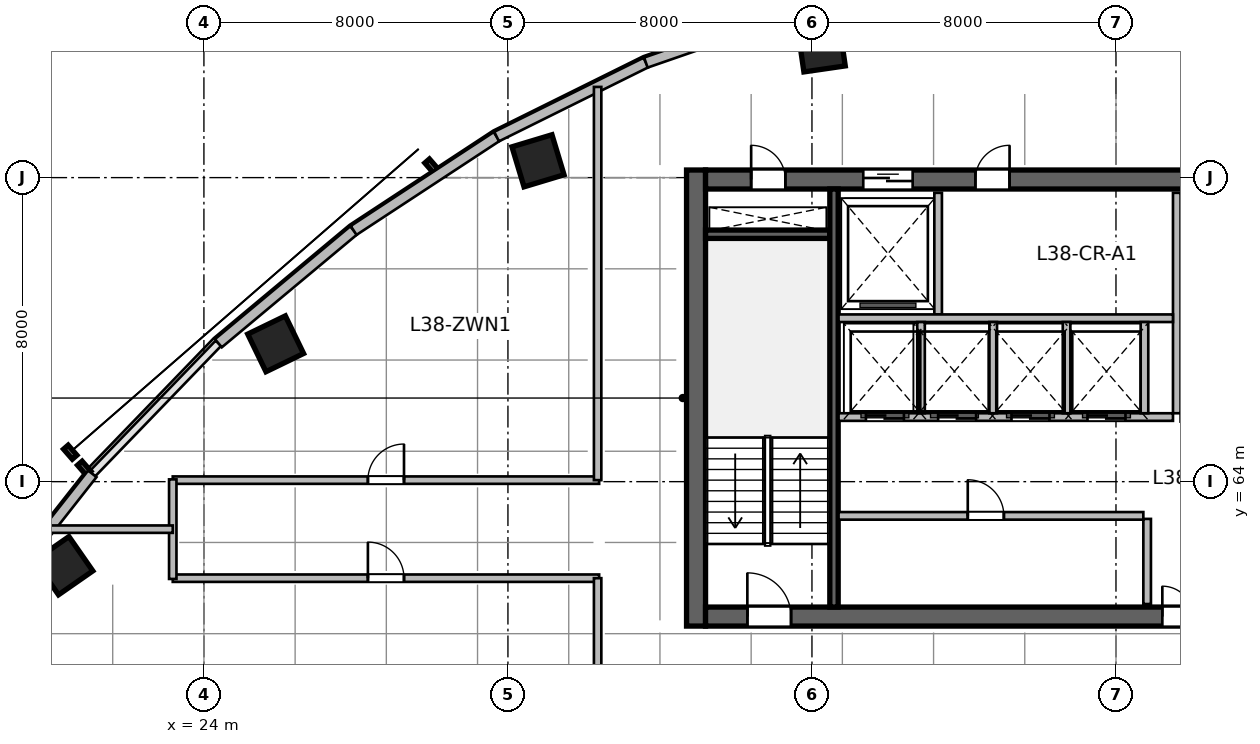
"""IFC4 building model, lengths in metres.
Left out: names, types, materials, properties, quantities, classifications, styles, units other than length and angle.
Written with IfcOpenShell. Run it as: python <this file> out.ifc"""

import sys

from ifc_helpers import new_model, si_unit, direction, frame, frame_2d, origin, origin_2d, place, context, subcontext, project, spatial, rectangle, extrude, source, transform, mapped, element, fill, save


model = new_model("IFC4")
c1 = context("Model", 3, precision=1e-05, world=origin(), true_north=direction((0.0, 1.0)))
c2 = subcontext(c1, "Body", "Model", "MODEL_VIEW")
j1 = project(units=[si_unit("LENGTHUNIT", "METRE"), si_unit("PLANEANGLEUNIT", "RADIAN")], contexts=[c1])
p1 = place(None, origin())
s1 = spatial("IfcSite", under=j1, at=p1, CompositionType="ELEMENT")
p2 = place(p1, origin())
s2 = spatial("IfcBuilding", under=s1, at=p2, CompositionType="ELEMENT")
p3 = place(p2, frame((0.0, 0.0, 158.4)))
s3 = spatial("IfcBuildingStorey", under=s2, at=p3, CompositionType="ELEMENT", Elevation=158.4)
m1 = source(origin(), c2, "Body", "SweptSolid", [
    extrude(rectangle(XDim=12.0, YDim=0.5, at=frame_2d((6.0, 0.0))), origin(), (0.0, 0.0, 1.0), 3.9),
])
p4 = place(p3, frame((36.95, 60.2, 0.0), z_axis=(0.0, 0.0, 1.0), x_axis=(0.0, 1.0, 0.0)))
e1 = element("IfcWall", 1, at=p4, inside=s3, PredefinedType="SHEAR", context=c2, shape_type="MappedRepresentation", body=[
    mapped(m1, transform((0.0, 0.0, 0.0), scale=1.0)),
])
m2 = source(origin(), c2, "Body", "SweptSolid", [
    extrude(rectangle(XDim=21.6, YDim=0.5, at=frame_2d((10.8, 0.0))), origin(), (0.0, 0.0, 1.0), 3.9),
])
p5 = place(p3, frame((37.2, 60.45, 0.0), z_axis=(0.0, 0.0, 1.0), x_axis=(1.0, 0.0, 0.0)))
e2 = element("IfcWall", 2, at=p5, inside=s3, PredefinedType="SHEAR", context=c2, shape_type="MappedRepresentation", body=[
    mapped(m2, transform((0.0, 0.0, 0.0), scale=1.0)),
])
p6 = place(p5, frame((1.1, 0.0, 0.0)))
e3 = element("IfcOpeningElement", 3, at=p6, cuts=e2, PredefinedType="OPENING", context=c2, shape_type="SweptSolid", body=[
    extrude(rectangle(XDim=1.15, YDim=2.15, at=frame_2d((0.575, 1.075))), frame((0.0, 0.26, 0.0), z_axis=(0.0, -1.0, 0.0), x_axis=(1.0, 0.0, 0.0)), (0.0, 0.0, 1.0), 0.52),
])
p7 = place(p5, frame((19.5, 0.0, 0.0)))
e4 = element("IfcOpeningElement", 4, at=p7, cuts=e2, PredefinedType="OPENING", context=c2, shape_type="SweptSolid", body=[
    extrude(rectangle(XDim=0.9, YDim=2.1, at=frame_2d((0.45, 1.05))), frame((0.0, 0.26, 0.0), z_axis=(0.0, -1.0, 0.0), x_axis=(1.0, 0.0, 0.0)), (0.0, 0.0, 1.0), 0.52),
])
p8 = place(p5, frame((12.02, 0.0, 0.0)))
e5 = element("IfcOpeningElement", 5, at=p8, cuts=e2, PredefinedType="OPENING", context=c2, shape_type="SweptSolid", body=[
    extrude(rectangle(XDim=1.6, YDim=2.15, at=frame_2d((0.8, 1.075))), frame((0.0, 0.26, 0.0), z_axis=(0.0, -1.0, 0.0), x_axis=(1.0, 0.0, 0.0)), (0.0, 0.0, 1.0), 0.52),
])
p9 = place(p3, frame((37.2, 71.95, 0.0), z_axis=(0.0, 0.0, 1.0), x_axis=(1.0, 0.0, 0.0)))
e6 = element("IfcWall", 6, at=p9, inside=s3, PredefinedType="SHEAR", context=c2, shape_type="MappedRepresentation", body=[
    mapped(m2, transform((0.0, 0.0, 0.0), scale=1.0)),
])
p10 = place(p9, frame((1.2, 0.0, 0.0)))
e7 = element("IfcOpeningElement", 7, at=p10, cuts=e6, PredefinedType="OPENING", context=c2, shape_type="SweptSolid", body=[
    extrude(rectangle(XDim=0.9, YDim=2.1, at=frame_2d((0.45, 1.05))), frame((0.0, 0.26, 0.0), z_axis=(0.0, -1.0, 0.0), x_axis=(1.0, 0.0, 0.0)), (0.0, 0.0, 1.0), 0.52),
])
p11 = place(p9, frame((14.7, 0.0, 0.0)))
e8 = element("IfcOpeningElement", 8, at=p11, cuts=e6, PredefinedType="OPENING", context=c2, shape_type="SweptSolid", body=[
    extrude(rectangle(XDim=1.2, YDim=2.15, at=frame_2d((0.6, 1.075))), frame((0.0, 0.26, 0.0), z_axis=(0.0, -1.0, 0.0), x_axis=(1.0, 0.0, 0.0)), (0.0, 0.0, 1.0), 0.52),
])
p12 = place(p9, frame((4.15, 0.0, 0.0)))
e9 = element("IfcOpeningElement", 9, at=p12, cuts=e6, PredefinedType="OPENING", context=c2, shape_type="SweptSolid", body=[
    extrude(rectangle(XDim=1.3, YDim=2.15, at=frame_2d((0.65, 1.075))), frame((0.0, 0.26, 0.0), z_axis=(0.0, -1.0, 0.0), x_axis=(1.0, 0.0, 0.0)), (0.0, 0.0, 1.0), 0.52),
])
p13 = place(p9, frame((7.1, 0.0, 0.0)))
e10 = element("IfcOpeningElement", 10, at=p13, cuts=e6, PredefinedType="OPENING", context=c2, shape_type="SweptSolid", body=[
    extrude(rectangle(XDim=0.9, YDim=2.1, at=frame_2d((0.45, 1.05))), frame((0.0, 0.26, 0.0), z_axis=(0.0, -1.0, 0.0), x_axis=(1.0, 0.0, 0.0)), (0.0, 0.0, 1.0), 0.52),
])
m3 = source(origin(), c2, "Body", "SweptSolid", [
    extrude(rectangle(XDim=3.27, YDim=0.22, at=frame_2d((1.635, 0.0))), origin(), (0.0, 0.0, 1.0), 3.9),
])
p14 = place(p3, frame((37.2, 70.51, 0.0), z_axis=(0.0, 0.0, 1.0), x_axis=(1.0, 0.0, 0.0)))
e11 = element("IfcWall", 11, at=p14, inside=s3, PredefinedType="SHEAR", context=c2, shape_type="MappedRepresentation", body=[
    mapped(m3, transform((0.0, 0.0, 0.0), scale=1.0)),
])
m4 = source(origin(), c2, "Body", "SweptSolid", [
    extrude(rectangle(XDim=11.0, YDim=0.22, at=frame_2d((5.5, 0.0))), origin(), (0.0, 0.0, 1.0), 3.9),
])
p15 = place(p3, frame((40.58, 60.7, 0.0), z_axis=(0.0, 0.0, 1.0), x_axis=(0.0, 1.0, 0.0)))
e12 = element("IfcWall", 12, at=p15, inside=s3, PredefinedType="SHEAR", context=c2, shape_type="MappedRepresentation", body=[
    mapped(m4, transform((0.0, 0.0, 0.0), scale=1.0)),
])
m5 = source(origin(), c2, "Body", "SweptSolid", [
    extrude(rectangle(XDim=1.1, YDim=1.1, at=origin_2d()), origin(), (0.0, 0.0, 1.0), 3.9),
])
for number, where, z_axis, x_axis in (
    (13, (20.311, 61.789, 0.0), (0.0, 0.0, 1.0), (-0.571, 0.821, 0.0)),
    (14, (25.888, 67.627, 0.0), (0.0, 0.0, 1.0), (-0.436, 0.9, 0.0)),
    (15, (32.791, 72.442, 0.0), (0.0, 0.0, 1.0), (-0.289, 0.957, 0.0)),
    (16, (40.253, 75.404, 0.0), (0.0, 0.0, 1.0), (-0.143, 0.99, 0.0)),
):
    element("IfcColumn", number, at=place(p3, frame(where, z_axis=z_axis, x_axis=x_axis)), inside=s3, PredefinedType="COLUMN", context=c2, shape_type="MappedRepresentation", body=[
        mapped(m5, transform((0.0, 0.0, 0.0), scale=1.0)),
    ])
m6 = source(origin(), c2, "Body", "SweptSolid", [
    extrude(rectangle(XDim=4.922, YDim=0.28, at=frame_2d((2.461, 0.0))), origin(), (0.0, 0.0, 1.0), 3.65),
])
p16 = place(p3, frame((18.021, 60.338, 0.0), z_axis=(0.0, 0.0, 1.0), x_axis=(0.61817639101, 0.786039407153, 0.0)))
e17 = element("IfcWall", 17, at=p16, inside=s3, PredefinedType="SOLIDWALL", context=c2, shape_type="MappedRepresentation", body=[
    mapped(m6, transform((0.0, 0.0, 0.0), scale=1.0)),
])
m7 = source(origin(), c2, "Body", "SweptSolid", [
    extrude(rectangle(XDim=4.634, YDim=0.28, at=frame_2d((2.317, 0.0))), origin(), (0.0, 0.0, 1.0), 3.65),
])
p17 = place(p3, frame((24.381, 67.642, 0.0), z_axis=(0.0, 0.0, 1.0), x_axis=(0.767910229096, 0.640557475993, 0.0)))
e18 = element("IfcWall", 18, at=p17, inside=s3, PredefinedType="SOLIDWALL", context=c2, shape_type="MappedRepresentation", body=[
    mapped(m7, transform((0.0, 0.0, 0.0), scale=1.0)),
])
m8 = source(origin(), c2, "Body", "SweptSolid", [
    extrude(rectangle(XDim=4.501, YDim=0.28, at=frame_2d((2.25, 0.0))), origin(), (0.0, 0.0, 1.0), 3.65),
])
p18 = place(p3, frame((27.939, 70.61, 0.0), z_axis=(0.0, 0.0, 1.0), x_axis=(0.835984920737, 0.548752414391, 0.0)))
e19 = element("IfcWall", 19, at=p18, inside=s3, PredefinedType="SOLIDWALL", context=c2, shape_type="MappedRepresentation", body=[
    mapped(m8, transform((0.0, 0.0, 0.0), scale=1.0)),
])
m9 = source(origin(), c2, "Body", "SweptSolid", [
    extrude(rectangle(XDim=4.384, YDim=0.28, at=frame_2d((2.192, 0.0))), origin(), (0.0, 0.0, 1.0), 3.65),
])
p19 = place(p3, frame((31.702, 73.08, 0.0), z_axis=(0.0, 0.0, 1.0), x_axis=(0.895969968053, 0.444114643248, 0.0)))
e20 = element("IfcWall", 20, at=p19, inside=s3, PredefinedType="SOLIDWALL", context=c2, shape_type="MappedRepresentation", body=[
    mapped(m9, transform((0.0, 0.0, 0.0), scale=1.0)),
])
m10 = source(origin(), c2, "Body", "SweptSolid", [
    extrude(rectangle(XDim=4.29, YDim=0.28, at=frame_2d((2.145, 0.0))), origin(), (0.0, 0.0, 1.0), 3.65),
])
p20 = place(p3, frame((35.63, 75.027, 0.0), z_axis=(0.0, 0.0, 1.0), x_axis=(0.944883859218, 0.3274057003, 0.0)))
e21 = element("IfcWall", 21, at=p20, inside=s3, PredefinedType="SOLIDWALL", context=c2, shape_type="MappedRepresentation", body=[
    mapped(m10, transform((0.0, 0.0, 0.0), scale=1.0)),
])
m11 = source(origin(), c2, "Body", "SweptSolid", [
    extrude(rectangle(XDim=2.24, YDim=0.2, at=frame_2d((1.12, 0.0))), origin(), (0.0, 0.0, 1.0), 3.65),
])
p21 = place(p3, frame((48.82, 60.78, 0.0), z_axis=(0.0, 0.0, 1.0), x_axis=(0.0, 1.0, 0.0)))
e22 = element("IfcWall", 22, at=p21, inside=s3, PredefinedType="SOLIDWALL", context=c2, shape_type="MappedRepresentation", body=[
    mapped(m11, transform((0.0, 0.0, 0.0), scale=1.0)),
])
m12 = source(origin(), c2, "Body", "SweptSolid", [
    extrude(rectangle(XDim=5.8, YDim=0.2, at=frame_2d((2.9, 0.0))), origin(), (0.0, 0.0, 1.0), 3.65),
])
p22 = place(p3, frame((49.6, 65.8, 0.0), z_axis=(0.0, 0.0, 1.0), x_axis=(0.0, 1.0, 0.0)))
e23 = element("IfcWall", 23, at=p22, inside=s3, PredefinedType="SOLIDWALL", context=c2, shape_type="MappedRepresentation", body=[
    mapped(m12, transform((0.0, 0.0, 0.0), scale=1.0)),
])
m13 = source(origin(), c2, "Body", "SweptSolid", [
    extrude(rectangle(XDim=3.2, YDim=0.2, at=frame_2d((1.6, 0.0))), origin(), (0.0, 0.0, 1.0), 3.65),
])
p23 = place(p3, frame((43.32, 68.4, 0.0), z_axis=(0.0, 0.0, 1.0), x_axis=(0.0, 1.0, 0.0)))
e24 = element("IfcWall", 24, at=p23, inside=s3, PredefinedType="SOLIDWALL", context=c2, shape_type="MappedRepresentation", body=[
    mapped(m13, transform((0.0, 0.0, 0.0), scale=1.0)),
])
m14 = source(origin(), c2, "Body", "SweptSolid", [
    extrude(rectangle(XDim=8.8, YDim=0.2, at=frame_2d((4.4, 0.0))), origin(), (0.0, 0.0, 1.0), 3.65),
])
p24 = place(p3, frame((40.7, 68.3, 0.0), z_axis=(0.0, 0.0, 1.0), x_axis=(1.0, 0.0, 0.0)))
e25 = element("IfcWall", 25, at=p24, inside=s3, PredefinedType="SOLIDWALL", context=c2, shape_type="MappedRepresentation", body=[
    mapped(m14, transform((0.0, 0.0, 0.0), scale=1.0)),
])
m15 = source(origin(), c2, "Body", "SweptSolid", [
    extrude(rectangle(XDim=8.02, YDim=0.2, at=frame_2d((4.01, 0.0))), origin(), (0.0, 0.0, 1.0), 3.65),
])
p25 = place(p3, frame((40.7, 63.1, 0.0), z_axis=(0.0, 0.0, 1.0), x_axis=(1.0, 0.0, 0.0)))
e26 = element("IfcWall", 26, at=p25, inside=s3, PredefinedType="SOLIDWALL", context=c2, shape_type="MappedRepresentation", body=[
    mapped(m15, transform((0.0, 0.0, 0.0), scale=1.0)),
])
p26 = place(p25, frame((3.4, 0.0, 0.0)))
e27 = element("IfcOpeningElement", 27, at=p26, cuts=e26, PredefinedType="OPENING", context=c2, shape_type="SweptSolid", body=[
    extrude(rectangle(XDim=0.95, YDim=2.15, at=frame_2d((0.475, 1.075))), frame((0.0, 0.11, 0.0), z_axis=(0.0, -1.0, 0.0), x_axis=(1.0, 0.0, 0.0)), (0.0, 0.0, 1.0), 0.22),
])
p27 = place(p3, frame((40.7, 65.7, 0.0), z_axis=(0.0, 0.0, 1.0), x_axis=(1.0, 0.0, 0.0)))
e28 = element("IfcWall", 28, at=p27, inside=s3, PredefinedType="SOLIDWALL", context=c2, shape_type="MappedRepresentation", body=[
    mapped(m14, transform((0.0, 0.0, 0.0), scale=1.0)),
])
p28 = place(p27, frame((0.72, 0.0, 0.0)))
e29 = element("IfcOpeningElement", 29, at=p28, cuts=e28, PredefinedType="OPENING", context=c2, shape_type="SweptSolid", body=[
    extrude(rectangle(XDim=1.0, YDim=2.15, at=frame_2d((0.5, 1.075))), frame((0.0, 0.11, 0.0), z_axis=(0.0, -1.0, 0.0), x_axis=(1.0, 0.0, 0.0)), (0.0, 0.0, 1.0), 0.22),
])
p29 = place(p27, frame((2.62, 0.0, 0.0)))
e30 = element("IfcOpeningElement", 30, at=p29, cuts=e28, PredefinedType="OPENING", context=c2, shape_type="SweptSolid", body=[
    extrude(rectangle(XDim=1.0, YDim=2.15, at=frame_2d((0.5, 1.075))), frame((0.0, 0.11, 0.0), z_axis=(0.0, -1.0, 0.0), x_axis=(1.0, 0.0, 0.0)), (0.0, 0.0, 1.0), 0.22),
])
p30 = place(p27, frame((4.55, 0.0, 0.0)))
e31 = element("IfcOpeningElement", 31, at=p30, cuts=e28, PredefinedType="OPENING", context=c2, shape_type="SweptSolid", body=[
    extrude(rectangle(XDim=1.0, YDim=2.15, at=frame_2d((0.5, 1.075))), frame((0.0, 0.11, 0.0), z_axis=(0.0, -1.0, 0.0), x_axis=(1.0, 0.0, 0.0)), (0.0, 0.0, 1.0), 0.22),
])
p31 = place(p27, frame((6.55, 0.0, 0.0)))
e32 = element("IfcOpeningElement", 32, at=p31, cuts=e28, PredefinedType="OPENING", context=c2, shape_type="SweptSolid", body=[
    extrude(rectangle(XDim=1.0, YDim=2.15, at=frame_2d((0.5, 1.075))), frame((0.0, 0.11, 0.0), z_axis=(0.0, -1.0, 0.0), x_axis=(1.0, 0.0, 0.0)), (0.0, 0.0, 1.0), 0.22),
])
m16 = source(origin(), c2, "Body", "SweptSolid", [
    extrude(rectangle(XDim=2.4, YDim=0.2, at=frame_2d((1.2, 0.0))), origin(), (0.0, 0.0, 1.0), 3.65),
])
for number, where, z_axis, x_axis in (
    (33, (48.75, 65.8, 0.0), (0.0, 0.0, 1.0), (0.0, 1.0, 0.0)),
    (34, (42.87, 65.8, 0.0), (0.0, 0.0, 1.0), (0.0, 1.0, 0.0)),
    (35, (44.77, 65.8, 0.0), (0.0, 0.0, 1.0), (0.0, 1.0, 0.0)),
    (36, (46.7, 65.8, 0.0), (0.0, 0.0, 1.0), (0.0, 1.0, 0.0)),
):
    element("IfcWall", number, at=place(p3, frame(where, z_axis=z_axis, x_axis=x_axis)), inside=s3, PredefinedType="SOLIDWALL", context=c2, shape_type="MappedRepresentation", body=[
        mapped(m16, transform((0.0, 0.0, 0.0), scale=1.0)),
    ])
m17 = source(origin(), c2, "Body", "SweptSolid", [
    extrude(rectangle(XDim=11.22, YDim=0.195, at=frame_2d((5.61, 0.0))), origin(), (0.0, 0.0, 1.0), 3.65),
])
p32 = place(p3, frame((23.18, 64.04, 0.0), z_axis=(0.0, 0.0, 1.0), x_axis=(1.0, 0.0, 0.0)))
e37 = element("IfcWall", 37, at=p32, inside=s3, PredefinedType="PARTITIONING", context=c2, shape_type="MappedRepresentation", body=[
    mapped(m17, transform((0.0, 0.0, 0.0), scale=1.0)),
])
p33 = place(p32, frame((5.135, 0.0, 0.0)))
e38 = element("IfcOpeningElement", 38, at=p33, cuts=e37, PredefinedType="OPENING", context=c2, shape_type="SweptSolid", body=[
    extrude(rectangle(XDim=0.95, YDim=2.1, at=frame_2d((0.475, 1.05))), frame((0.0, 0.107, 0.0), z_axis=(0.0, -1.0, 0.0), x_axis=(1.0, 0.0, 0.0)), (0.0, 0.0, 1.0), 0.215),
])
p34 = place(p3, frame((23.18, 61.46, 0.0), z_axis=(0.0, 0.0, 1.0), x_axis=(1.0, 0.0, 0.0)))
e39 = element("IfcWall", 39, at=p34, inside=s3, PredefinedType="PARTITIONING", context=c2, shape_type="MappedRepresentation", body=[
    mapped(m17, transform((0.0, 0.0, 0.0), scale=1.0)),
])
p35 = place(p34, frame((5.135, 0.0, 0.0)))
e40 = element("IfcOpeningElement", 40, at=p35, cuts=e39, PredefinedType="OPENING", context=c2, shape_type="SweptSolid", body=[
    extrude(rectangle(XDim=0.95, YDim=2.1, at=frame_2d((0.475, 1.05))), frame((0.0, 0.107, 0.0), z_axis=(0.0, -1.0, 0.0), x_axis=(1.0, 0.0, 0.0)), (0.0, 0.0, 1.0), 0.215),
])
m18 = source(origin(), c2, "Body", "SweptSolid", [
    extrude(rectangle(XDim=12.126, YDim=0.195, at=frame_2d((6.063, 0.0))), origin(), (0.0, 0.0, 1.0), 3.65),
])
p36 = place(p3, frame((34.36, 49.334, 0.0), z_axis=(0.0, 0.0, 1.0), x_axis=(0.0, 1.0, 0.0)))
e41 = element("IfcWall", 41, at=p36, inside=s3, PredefinedType="PARTITIONING", context=c2, shape_type="MappedRepresentation", body=[
    mapped(m18, transform((0.0, 0.0, 0.0), scale=1.0)),
])
m19 = source(origin(), c2, "Body", "SweptSolid", [
    extrude(rectangle(XDim=10.346, YDim=0.195, at=frame_2d((5.173, 0.0))), origin(), (0.0, 0.0, 1.0), 3.65),
])
p37 = place(p3, frame((34.36, 64.04, 0.0), z_axis=(0.0, 0.0, 1.0), x_axis=(0.0, 1.0, 0.0)))
e42 = element("IfcWall", 42, at=p37, inside=s3, PredefinedType="PARTITIONING", context=c2, shape_type="MappedRepresentation", body=[
    mapped(m19, transform((0.0, 0.0, 0.0), scale=1.0)),
])
m20 = source(origin(), c2, "Body", "SweptSolid", [
    extrude(rectangle(XDim=2.62, YDim=0.195, at=frame_2d((1.31, 0.0))), origin(), (0.0, 0.0, 1.0), 3.65),
])
p38 = place(p3, frame((23.18, 61.44, 0.0), z_axis=(0.0, 0.0, 1.0), x_axis=(0.0, 1.0, 0.0)))
e43 = element("IfcWall", 43, at=p38, inside=s3, PredefinedType="PARTITIONING", context=c2, shape_type="MappedRepresentation", body=[
    mapped(m20, transform((0.0, 0.0, 0.0), scale=1.0)),
])
m21 = source(origin(), c2, "Body", "SweptSolid", [
    extrude(rectangle(XDim=3.249, YDim=0.195, at=frame_2d((1.625, 0.0))), origin(), (0.0, 0.0, 1.0), 3.65),
])
p39 = place(p3, frame((19.931, 62.75, 0.0), z_axis=(0.0, 0.0, 1.0), x_axis=(1.0, 0.0, 0.0)))
e44 = element("IfcWall", 44, at=p39, inside=s3, PredefinedType="PARTITIONING", context=c2, shape_type="MappedRepresentation", body=[
    mapped(m21, transform((0.0, 0.0, 0.0), scale=1.0)),
])
m22 = source(origin(), c2, "Body", "SweptSolid", [
    extrude(rectangle(XDim=1.15, YDim=2.15, at=frame_2d((0.575, 1.075))), frame((0.0, 0.025, 0.0), z_axis=(0.0, -1.0, 0.0), x_axis=(1.0, 0.0, 0.0)), (0.0, 0.0, 1.0), 0.05),
])
p40 = place(p6, origin())
e45 = element("IfcDoor", 45, at=p40, inside=s3, OperationType="SINGLE_SWING_LEFT", PredefinedType="DOOR", context=c2, shape_type="MappedRepresentation", body=[
    mapped(m22, transform((0.0, 0.0, 0.0), scale=1.0)),
])
fill(e3, e45)
m23 = source(origin(), c2, "Body", "SweptSolid", [
    extrude(rectangle(XDim=0.9, YDim=2.1, at=frame_2d((0.45, 1.05))), frame((0.0, 0.025, 0.0), z_axis=(0.0, -1.0, 0.0), x_axis=(1.0, 0.0, 0.0)), (0.0, 0.0, 1.0), 0.05),
])
p41 = place(p10, origin())
e46 = element("IfcDoor", 46, at=p41, inside=s3, OperationType="SINGLE_SWING_LEFT", PredefinedType="DOOR", context=c2, shape_type="MappedRepresentation", body=[
    mapped(m23, transform((0.0, 0.0, 0.0), scale=1.0)),
])
fill(e7, e46)
m24 = source(origin(), c2, "Body", "SweptSolid", [
    extrude(rectangle(XDim=1.6, YDim=2.15, at=frame_2d((0.8, 1.075))), frame((0.0, 0.025, 0.0), z_axis=(0.0, -1.0, 0.0), x_axis=(1.0, 0.0, 0.0)), (0.0, 0.0, 1.0), 0.05),
])
p42 = place(p8, origin())
e47 = element("IfcDoor", 47, at=p42, inside=s3, OperationType="DOUBLE_DOOR_SINGLE_SWING", PredefinedType="DOOR", context=c2, shape_type="MappedRepresentation", body=[
    mapped(m24, transform((0.0, 0.0, 0.0), scale=1.0)),
])
fill(e5, e47)
m25 = source(origin(), c2, "Body", "SweptSolid", [
    extrude(rectangle(XDim=1.3, YDim=2.15, at=frame_2d((0.65, 1.075))), frame((0.0, 0.025, 0.0), z_axis=(0.0, -1.0, 0.0), x_axis=(1.0, 0.0, 0.0)), (0.0, 0.0, 1.0), 0.05),
])
p43 = place(p12, origin())
e48 = element("IfcDoor", 48, at=p43, inside=s3, OperationType="DOUBLE_DOOR_SLIDING", PredefinedType="DOOR", context=c2, shape_type="MappedRepresentation", body=[
    mapped(m25, transform((0.0, 0.0, 0.0), scale=1.0)),
])
fill(e9, e48)
p44 = place(p13, origin())
e49 = element("IfcDoor", 49, at=p44, inside=s3, OperationType="SINGLE_SWING_RIGHT", PredefinedType="DOOR", context=c2, shape_type="MappedRepresentation", body=[
    mapped(m23, transform((0.0, 0.0, 0.0), scale=1.0)),
])
fill(e10, e49)
m26 = source(origin(), c2, "Body", "SweptSolid", [
    extrude(rectangle(XDim=0.95, YDim=2.15, at=frame_2d((0.475, 1.075))), frame((0.0, 0.025, 0.0), z_axis=(0.0, -1.0, 0.0), x_axis=(1.0, 0.0, 0.0)), (0.0, 0.0, 1.0), 0.05),
])
p45 = place(p26, origin())
e50 = element("IfcDoor", 50, at=p45, inside=s3, OperationType="SINGLE_SWING_LEFT", PredefinedType="DOOR", context=c2, shape_type="MappedRepresentation", body=[
    mapped(m26, transform((0.0, 0.0, 0.0), scale=1.0)),
])
fill(e27, e50)
m27 = source(origin(), c2, "Body", "SweptSolid", [
    extrude(rectangle(XDim=1.0, YDim=2.15, at=frame_2d((0.5, 1.075))), frame((0.0, 0.025, 0.0), z_axis=(0.0, -1.0, 0.0), x_axis=(1.0, 0.0, 0.0)), (0.0, 0.0, 1.0), 0.05),
])
p46 = place(p28, origin())
e51 = element("IfcDoor", 51, at=p46, inside=s3, OperationType="DOUBLE_DOOR_SLIDING", PredefinedType="DOOR", context=c2, shape_type="MappedRepresentation", body=[
    mapped(m27, transform((0.0, 0.0, 0.0), scale=1.0)),
])
fill(e29, e51)
p47 = place(p29, origin())
e52 = element("IfcDoor", 52, at=p47, inside=s3, OperationType="DOUBLE_DOOR_SLIDING", PredefinedType="DOOR", context=c2, shape_type="MappedRepresentation", body=[
    mapped(m27, transform((0.0, 0.0, 0.0), scale=1.0)),
])
fill(e30, e52)
p48 = place(p30, origin())
e53 = element("IfcDoor", 53, at=p48, inside=s3, OperationType="DOUBLE_DOOR_SLIDING", PredefinedType="DOOR", context=c2, shape_type="MappedRepresentation", body=[
    mapped(m27, transform((0.0, 0.0, 0.0), scale=1.0)),
])
fill(e31, e53)
p49 = place(p31, origin())
e54 = element("IfcDoor", 54, at=p49, inside=s3, OperationType="DOUBLE_DOOR_SLIDING", PredefinedType="DOOR", context=c2, shape_type="MappedRepresentation", body=[
    mapped(m27, transform((0.0, 0.0, 0.0), scale=1.0)),
])
fill(e32, e54)
m28 = source(origin(), c2, "Body", "SweptSolid", [
    extrude(rectangle(XDim=0.95, YDim=2.1, at=frame_2d((0.475, 1.05))), frame((0.0, 0.025, 0.0), z_axis=(0.0, -1.0, 0.0), x_axis=(1.0, 0.0, 0.0)), (0.0, 0.0, 1.0), 0.05),
])
p50 = place(p33, origin())
e55 = element("IfcDoor", 55, at=p50, inside=s3, OperationType="SINGLE_SWING_RIGHT", PredefinedType="DOOR", context=c2, shape_type="MappedRepresentation", body=[
    mapped(m28, transform((0.0, 0.0, 0.0), scale=1.0)),
])
fill(e38, e55)
p51 = place(p35, origin())
e56 = element("IfcDoor", 56, at=p51, inside=s3, OperationType="SINGLE_SWING_LEFT", PredefinedType="DOOR", context=c2, shape_type="MappedRepresentation", body=[
    mapped(m28, transform((0.0, 0.0, 0.0), scale=1.0)),
])
fill(e40, e56)
save(model, sys.argv[1])
